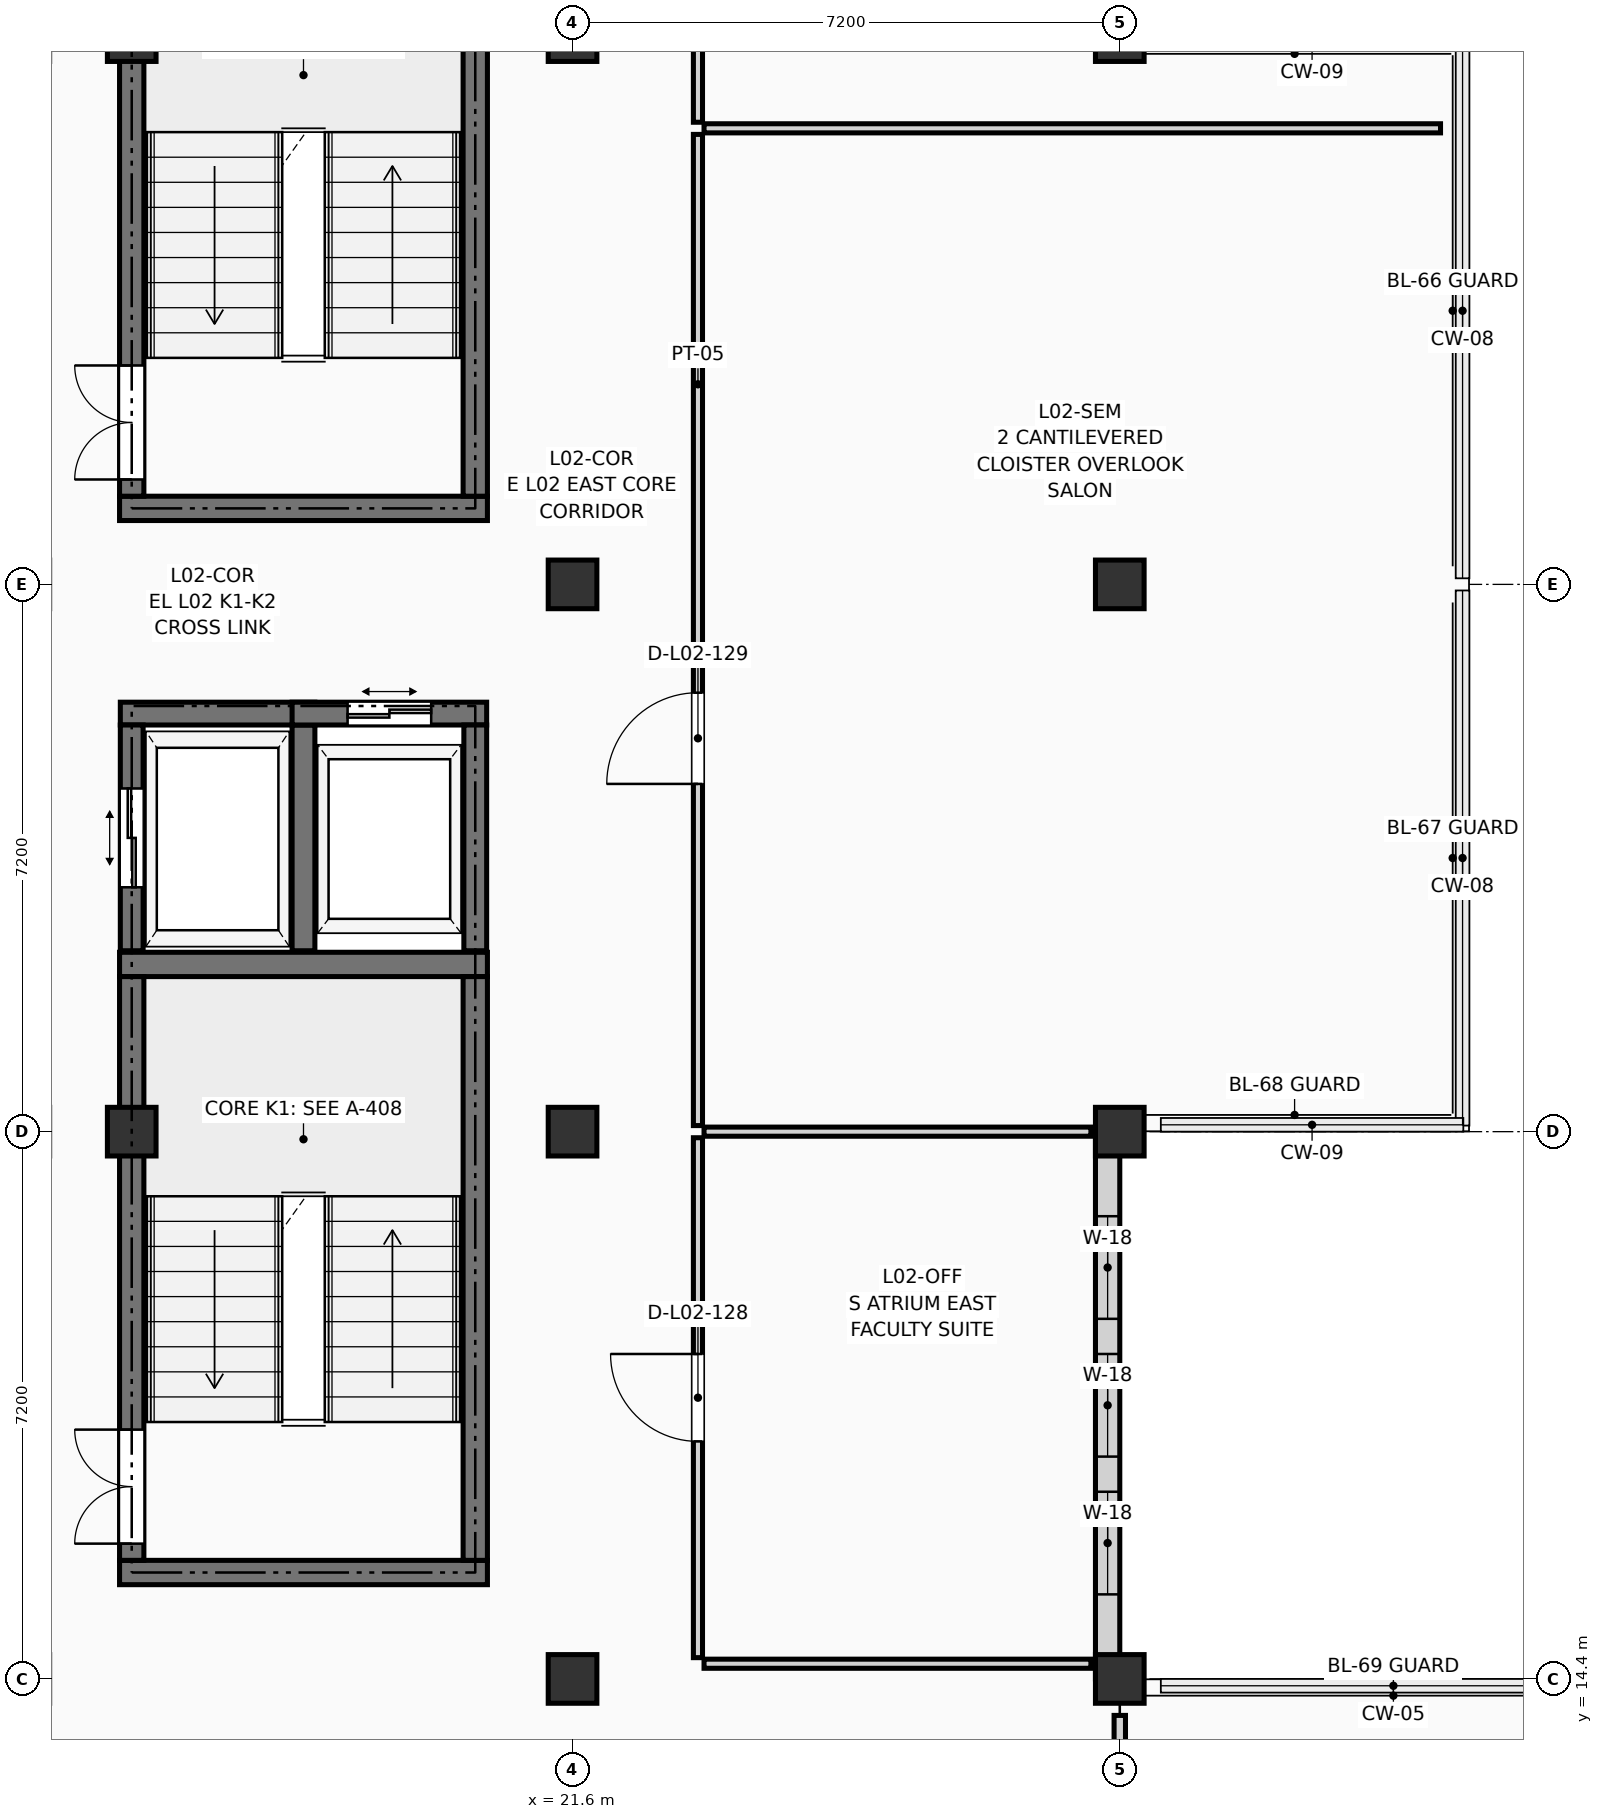
"""IFC4 building model, lengths in metres.
Left out: names, types, materials, properties, quantities, classifications, styles, units other than length and angle.
Written with IfcOpenShell. Run it as: python <this file> out.ifc"""

import sys

from ifc_helpers import new_model, si_unit, direction, frame, frame_2d, origin, origin_2d, place, context, subcontext, project, spatial, rectangle, extrude, element, fill, save


model = new_model("IFC4")
c1 = context("Model", 3, precision=1e-05, world=origin(), true_north=direction((0.0, 1.0)))
c2 = subcontext(c1, "Body", "Model", "MODEL_VIEW")
j1 = project(units=[si_unit("LENGTHUNIT", "METRE"), si_unit("PLANEANGLEUNIT", "RADIAN")], contexts=[c1])
p1 = place(None, origin())
s1 = spatial("IfcSite", under=j1, at=p1, CompositionType="ELEMENT")
p2 = place(p1, origin())
s2 = spatial("IfcBuilding", under=s1, at=p2, CompositionType="ELEMENT")
p3 = place(p2, frame((0.0, 0.0, 8.55)))
s3 = spatial("IfcBuildingStorey", under=s2, at=p3, CompositionType="ELEMENT", Elevation=8.55)
for number, where, z_axis, x_axis in (
    (1, (15.8, 21.6, 0.0), (0.0, 0.0, 1.0), (1.0, 0.0, 0.0)),
    (2, (15.8, 36.0, 0.0), (0.0, 0.0, 1.0), (1.0, 0.0, 0.0)),
    (3, (21.6, 14.4, 0.0), (0.0, 0.0, 1.0), (1.0, 0.0, 0.0)),
    (4, (21.6, 21.6, 0.0), (0.0, 0.0, 1.0), (1.0, 0.0, 0.0)),
    (5, (21.6, 28.8, 0.0), (0.0, 0.0, 1.0), (1.0, 0.0, 0.0)),
    (6, (21.6, 36.0, 0.0), (0.0, 0.0, 1.0), (1.0, 0.0, 0.0)),
    (7, (28.8, 14.4, 0.0), (0.0, 0.0, 1.0), (1.0, 0.0, 0.0)),
    (8, (28.8, 21.6, 0.0), (0.0, 0.0, 1.0), (1.0, 0.0, 0.0)),
    (9, (28.8, 28.8, 0.0), (0.0, 0.0, 1.0), (1.0, 0.0, 0.0)),
    (10, (28.8, 36.0, 0.0), (0.0, 0.0, 1.0), (1.0, 0.0, 0.0)),
):
    element("IfcColumn", number, at=place(p3, frame(where, z_axis=z_axis, x_axis=x_axis)), inside=s3, PredefinedType="COLUMN", context=c2, shape_type="SweptSolid", body=[
        extrude(rectangle(XDim=0.64, YDim=0.64, at=origin_2d()), origin(), (0.0, 0.0, 1.0), 3.6),
    ])
p4 = place(p3, frame((28.64, 14.4, 0.0), z_axis=(0.0, 0.0, 1.0), x_axis=(0.0, 1.0, 0.0)))
e11 = element("IfcWall", 11, at=p4, inside=s3, PredefinedType="SOLIDWALL", context=c2, shape_type="SweptSolid", body=[
    extrude(rectangle(XDim=7.2, YDim=0.32, at=frame_2d((3.6, 0.0))), origin(), (0.0, 0.0, 1.0), 2.84),
])
p5 = place(p4, frame((1.113, 0.0, 0.18)))
e12 = element("IfcOpeningElement", 12, at=p5, cuts=e11, PredefinedType="OPENING", context=c2, shape_type="SweptSolid", body=[
    extrude(rectangle(XDim=1.35, YDim=2.45, at=frame_2d((0.675, 1.225))), frame((0.0, 0.172, 0.0), z_axis=(0.0, -1.0, 0.0), x_axis=(1.0, 0.0, 0.0)), (0.0, 0.0, 1.0), 0.344),
])
p6 = place(p4, frame((2.925, 0.0, 0.18)))
e13 = element("IfcOpeningElement", 13, at=p6, cuts=e11, PredefinedType="OPENING", context=c2, shape_type="SweptSolid", body=[
    extrude(rectangle(XDim=1.35, YDim=2.45, at=frame_2d((0.675, 1.225))), frame((0.0, 0.172, 0.0), z_axis=(0.0, -1.0, 0.0), x_axis=(1.0, 0.0, 0.0)), (0.0, 0.0, 1.0), 0.344),
])
p7 = place(p4, frame((4.738, 0.0, 0.18)))
e14 = element("IfcOpeningElement", 14, at=p7, cuts=e11, PredefinedType="OPENING", context=c2, shape_type="SweptSolid", body=[
    extrude(rectangle(XDim=1.35, YDim=2.45, at=frame_2d((0.675, 1.225))), frame((0.0, 0.172, 0.0), z_axis=(0.0, -1.0, 0.0), x_axis=(1.0, 0.0, 0.0)), (0.0, 0.0, 1.0), 0.344),
])
for number, where, z_axis, x_axis in (
    (15, (15.64, 15.8, 0.0), (0.0, 0.0, 1.0), (1.0, 0.0, 0.0)),
    (16, (15.64, 23.8, 0.0), (0.0, 0.0, 1.0), (1.0, 0.0, 0.0)),
):
    element("IfcWall", number, at=place(p3, frame(where, z_axis=z_axis, x_axis=x_axis)), inside=s3, PredefinedType="SHEAR", context=c2, shape_type="SweptSolid", body=[
        extrude(rectangle(XDim=4.84, YDim=0.32, at=frame_2d((2.42, 0.0))), origin(), (0.0, 0.0, 1.0), 3.39),
    ])
p8 = place(p3, frame((15.8, 15.96, 0.0), z_axis=(0.0, 0.0, 1.0), x_axis=(0.0, 1.0, 0.0)))
e17 = element("IfcWall", 17, at=p8, inside=s3, PredefinedType="SHEAR", context=c2, shape_type="SweptSolid", body=[
    extrude(rectangle(XDim=7.68, YDim=0.32, at=frame_2d((3.84, 0.0))), origin(), (0.0, 0.0, 1.0), 3.39),
])
p9 = place(p8, frame((0.22, 0.0, 0.0)))
e18 = element("IfcOpeningElement", 18, at=p9, cuts=e17, PredefinedType="OPENING", context=c2, shape_type="SweptSolid", body=[
    extrude(rectangle(XDim=1.5, YDim=2.2, at=frame_2d((0.75, 1.1))), frame((0.0, 0.172, 0.0), z_axis=(0.0, -1.0, 0.0), x_axis=(1.0, 0.0, 0.0)), (0.0, 0.0, 1.0), 0.344),
])
p10 = place(p3, frame((20.32, 15.96, 0.0), z_axis=(0.0, 0.0, 1.0), x_axis=(0.0, 1.0, 0.0)))
e19 = element("IfcWall", 19, at=p10, inside=s3, PredefinedType="SHEAR", context=c2, shape_type="SweptSolid", body=[
    extrude(rectangle(XDim=7.68, YDim=0.32, at=frame_2d((3.84, 0.0))), origin(), (0.0, 0.0, 1.0), 3.39),
])
p11 = place(p3, frame((15.64, 29.8, 0.0), z_axis=(0.0, 0.0, 1.0), x_axis=(1.0, 0.0, 0.0)))
e20 = element("IfcWall", 20, at=p11, inside=s3, PredefinedType="SHEAR", context=c2, shape_type="SweptSolid", body=[
    extrude(rectangle(XDim=4.84, YDim=0.32, at=frame_2d((2.42, 0.0))), origin(), (0.0, 0.0, 1.0), 3.39),
])
p12 = place(p3, frame((15.8, 29.96, 0.0), z_axis=(0.0, 0.0, 1.0), x_axis=(0.0, 1.0, 0.0)))
e21 = element("IfcWall", 21, at=p12, inside=s3, PredefinedType="SHEAR", context=c2, shape_type="SweptSolid", body=[
    extrude(rectangle(XDim=7.68, YDim=0.32, at=frame_2d((3.84, 0.0))), origin(), (0.0, 0.0, 1.0), 3.39),
])
p13 = place(p12, frame((0.22, 0.0, 0.0)))
e22 = element("IfcOpeningElement", 22, at=p13, cuts=e21, PredefinedType="OPENING", context=c2, shape_type="SweptSolid", body=[
    extrude(rectangle(XDim=1.5, YDim=2.2, at=frame_2d((0.75, 1.1))), frame((0.0, 0.172, 0.0), z_axis=(0.0, -1.0, 0.0), x_axis=(1.0, 0.0, 0.0)), (0.0, 0.0, 1.0), 0.344),
])
p14 = place(p3, frame((20.32, 29.96, 0.0), z_axis=(0.0, 0.0, 1.0), x_axis=(0.0, 1.0, 0.0)))
e23 = element("IfcWall", 23, at=p14, inside=s3, PredefinedType="SHEAR", context=c2, shape_type="SweptSolid", body=[
    extrude(rectangle(XDim=7.68, YDim=0.32, at=frame_2d((3.84, 0.0))), origin(), (0.0, 0.0, 1.0), 3.39),
])
p15 = place(p3, frame((15.65, 27.1, 0.0), z_axis=(0.0, 0.0, 1.0), x_axis=(1.0, 0.0, 0.0)))
e24 = element("IfcWall", 24, at=p15, inside=s3, PredefinedType="SHEAR", context=c2, shape_type="SweptSolid", body=[
    extrude(rectangle(XDim=2.56, YDim=0.3, at=frame_2d((1.28, 0.0))), origin(), (0.0, 0.0, 1.0), 3.39),
])
p16 = place(p3, frame((15.8, 23.98, 0.0), z_axis=(0.0, 0.0, 1.0), x_axis=(0.0, 1.0, 0.0)))
e25 = element("IfcWall", 25, at=p16, inside=s3, PredefinedType="SHEAR", context=c2, shape_type="SweptSolid", body=[
    extrude(rectangle(XDim=2.97, YDim=0.3, at=frame_2d((1.485, 0.0))), origin(), (0.0, 0.0, 1.0), 3.39),
])
p17 = place(p16, frame((0.835, 0.0, 0.0)))
e26 = element("IfcOpeningElement", 26, at=p17, cuts=e25, PredefinedType="OPENING", context=c2, shape_type="SweptSolid", body=[
    extrude(rectangle(XDim=1.3, YDim=2.25, at=frame_2d((0.65, 1.125))), frame((0.0, 0.162, 0.0), z_axis=(0.0, -1.0, 0.0), x_axis=(1.0, 0.0, 0.0)), (0.0, 0.0, 1.0), 0.324),
])
p18 = place(p3, frame((18.06, 23.98, 0.0), z_axis=(0.0, 0.0, 1.0), x_axis=(0.0, 1.0, 0.0)))
e27 = element("IfcWall", 27, at=p18, inside=s3, PredefinedType="SHEAR", context=c2, shape_type="SweptSolid", body=[
    extrude(rectangle(XDim=2.97, YDim=0.3, at=frame_2d((1.485, 0.0))), origin(), (0.0, 0.0, 1.0), 3.39),
])
p19 = place(p3, frame((17.91, 27.1, 0.0), z_axis=(0.0, 0.0, 1.0), x_axis=(1.0, 0.0, 0.0)))
e28 = element("IfcWall", 28, at=p19, inside=s3, PredefinedType="SHEAR", context=c2, shape_type="SweptSolid", body=[
    extrude(rectangle(XDim=2.56, YDim=0.3, at=frame_2d((1.28, 0.0))), origin(), (0.0, 0.0, 1.0), 3.39),
])
p20 = place(p19, frame((0.73, 0.0, 0.0)))
e29 = element("IfcOpeningElement", 29, at=p20, cuts=e28, PredefinedType="OPENING", context=c2, shape_type="SweptSolid", body=[
    extrude(rectangle(XDim=1.1, YDim=2.2, at=frame_2d((0.55, 1.1))), frame((0.0, 0.162, 0.0), z_axis=(0.0, -1.0, 0.0), x_axis=(1.0, 0.0, 0.0)), (0.0, 0.0, 1.0), 0.324),
])
p21 = place(p3, frame((20.32, 23.98, 0.0), z_axis=(0.0, 0.0, 1.0), x_axis=(0.0, 1.0, 0.0)))
e30 = element("IfcWall", 30, at=p21, inside=s3, PredefinedType="SHEAR", context=c2, shape_type="SweptSolid", body=[
    extrude(rectangle(XDim=2.97, YDim=0.3, at=frame_2d((1.485, 0.0))), origin(), (0.0, 0.0, 1.0), 3.39),
])
p22 = place(p3, frame((28.8, 9.68, 0.0), z_axis=(0.0, 0.0, 1.0), x_axis=(0.0, 1.0, 0.0)))
e31 = element("IfcWall", 31, at=p22, inside=s3, PredefinedType="PARTITIONING", context=c2, shape_type="SweptSolid", body=[
    extrude(rectangle(XDim=4.24, YDim=0.15, at=frame_2d((2.12, 0.0))), origin(), (0.0, 0.0, 1.0), 2.655),
])
p23 = place(p3, frame((23.25, 14.68, 0.0), z_axis=(0.0, 0.0, 1.0), x_axis=(0.0, 1.0, 0.0)))
e32 = element("IfcWall", 32, at=p23, inside=s3, PredefinedType="PARTITIONING", context=c2, shape_type="SweptSolid", body=[
    extrude(rectangle(XDim=6.84, YDim=0.12, at=frame_2d((3.42, 0.0))), origin(), (0.0, 0.0, 1.0), 3.375),
])
p24 = place(p23, frame((2.845, 0.0, 0.0)))
e33 = element("IfcOpeningElement", 33, at=p24, cuts=e32, PredefinedType="OPENING", context=c2, shape_type="SweptSolid", body=[
    extrude(rectangle(XDim=1.15, YDim=2.18, at=frame_2d((0.575, 1.09))), frame((0.0, 0.072, 0.0), z_axis=(0.0, -1.0, 0.0), x_axis=(1.0, 0.0, 0.0)), (0.0, 0.0, 1.0), 0.144),
])
p25 = place(p3, frame((23.33, 14.6, 0.0), z_axis=(0.0, 0.0, 1.0), x_axis=(1.0, 0.0, 0.0)))
e34 = element("IfcWall", 34, at=p25, inside=s3, PredefinedType="PARTITIONING", context=c2, shape_type="SweptSolid", body=[
    extrude(rectangle(XDim=5.09, YDim=0.12, at=frame_2d((2.545, 0.0))), origin(), (0.0, 0.0, 1.0), 2.595),
])
p26 = place(p3, frame((23.33, 21.6, 0.0), z_axis=(0.0, 0.0, 1.0), x_axis=(1.0, 0.0, 0.0)))
e35 = element("IfcWall", 35, at=p26, inside=s3, PredefinedType="PARTITIONING", context=c2, shape_type="SweptSolid", body=[
    extrude(rectangle(XDim=5.09, YDim=0.12, at=frame_2d((2.545, 0.0))), origin(), (0.0, 0.0, 1.0), 2.691),
])
p27 = place(p3, frame((23.25, 21.68, 0.0), z_axis=(0.0, 0.0, 1.0), x_axis=(0.0, 1.0, 0.0)))
e36 = element("IfcWall", 36, at=p27, inside=s3, PredefinedType="PARTITIONING", context=c2, shape_type="SweptSolid", body=[
    extrude(rectangle(XDim=13.04, YDim=0.12, at=frame_2d((6.52, 0.0))), origin(), (0.0, 0.0, 1.0), 3.375),
])
p28 = place(p27, frame((4.495, 0.0, 0.0)))
e37 = element("IfcOpeningElement", 37, at=p28, cuts=e36, PredefinedType="OPENING", context=c2, shape_type="SweptSolid", body=[
    extrude(rectangle(XDim=1.2, YDim=2.15, at=frame_2d((0.6, 1.075))), frame((0.0, 0.072, 0.0), z_axis=(0.0, -1.0, 0.0), x_axis=(1.0, 0.0, 0.0)), (0.0, 0.0, 1.0), 0.144),
])
p29 = place(p3, frame((23.33, 34.8, 0.0), z_axis=(0.0, 0.0, 1.0), x_axis=(1.0, 0.0, 0.0)))
e38 = element("IfcWall", 38, at=p29, inside=s3, PredefinedType="PARTITIONING", context=c2, shape_type="SweptSolid", body=[
    extrude(rectangle(XDim=9.69, YDim=0.12, at=frame_2d((4.845, 0.0))), origin(), (0.0, 0.0, 1.0), 3.375),
])
p30 = place(p3, frame((23.25, 34.88, 0.0), z_axis=(0.0, 0.0, 1.0), x_axis=(0.0, 1.0, 0.0)))
e39 = element("IfcWall", 39, at=p30, inside=s3, PredefinedType="PARTITIONING", context=c2, shape_type="SweptSolid", body=[
    extrude(rectangle(XDim=8.44, YDim=0.12, at=frame_2d((4.22, 0.0))), origin(), (0.0, 0.0, 1.0), 3.375),
])
p31 = place(p5, origin())
e40 = element("IfcWindow", 40, at=p31, inside=s3, PartitioningType="SINGLE_PANEL", PredefinedType="WINDOW", context=c2, shape_type="SweptSolid", body=[
    extrude(rectangle(XDim=1.35, YDim=2.45, at=frame_2d((0.675, 1.225))), frame((0.0, 0.03, 0.0), z_axis=(0.0, -1.0, 0.0), x_axis=(1.0, 0.0, 0.0)), (0.0, 0.0, 1.0), 0.06),
])
fill(e12, e40)
p32 = place(p6, origin())
e41 = element("IfcWindow", 41, at=p32, inside=s3, PartitioningType="SINGLE_PANEL", PredefinedType="WINDOW", context=c2, shape_type="SweptSolid", body=[
    extrude(rectangle(XDim=1.35, YDim=2.45, at=frame_2d((0.675, 1.225))), frame((0.0, 0.03, 0.0), z_axis=(0.0, -1.0, 0.0), x_axis=(1.0, 0.0, 0.0)), (0.0, 0.0, 1.0), 0.06),
])
fill(e13, e41)
p33 = place(p7, origin())
e42 = element("IfcWindow", 42, at=p33, inside=s3, PartitioningType="SINGLE_PANEL", PredefinedType="WINDOW", context=c2, shape_type="SweptSolid", body=[
    extrude(rectangle(XDim=1.35, YDim=2.45, at=frame_2d((0.675, 1.225))), frame((0.0, 0.03, 0.0), z_axis=(0.0, -1.0, 0.0), x_axis=(1.0, 0.0, 0.0)), (0.0, 0.0, 1.0), 0.06),
])
fill(e14, e42)
p34 = place(p9, origin())
e43 = element("IfcDoor", 43, at=p34, inside=s3, OperationType="DOUBLE_DOOR_SINGLE_SWING", PredefinedType="DOOR", context=c2, shape_type="SweptSolid", body=[
    extrude(rectangle(XDim=1.5, YDim=2.2, at=frame_2d((0.75, 1.1))), frame((0.0, 0.025, 0.0), z_axis=(0.0, -1.0, 0.0), x_axis=(1.0, 0.0, 0.0)), (0.0, 0.0, 1.0), 0.05),
])
fill(e18, e43)
p35 = place(p13, origin())
e44 = element("IfcDoor", 44, at=p35, inside=s3, OperationType="DOUBLE_DOOR_SINGLE_SWING", PredefinedType="DOOR", context=c2, shape_type="SweptSolid", body=[
    extrude(rectangle(XDim=1.5, YDim=2.2, at=frame_2d((0.75, 1.1))), frame((0.0, 0.025, 0.0), z_axis=(0.0, -1.0, 0.0), x_axis=(1.0, 0.0, 0.0)), (0.0, 0.0, 1.0), 0.05),
])
fill(e22, e44)
p36 = place(p17, origin())
e45 = element("IfcDoor", 45, at=p36, inside=s3, OperationType="DOUBLE_DOOR_SLIDING", PredefinedType="DOOR", context=c2, shape_type="SweptSolid", body=[
    extrude(rectangle(XDim=1.3, YDim=2.25, at=frame_2d((0.65, 1.125))), frame((0.0, 0.025, 0.0), z_axis=(0.0, -1.0, 0.0), x_axis=(1.0, 0.0, 0.0)), (0.0, 0.0, 1.0), 0.05),
])
fill(e26, e45)
p37 = place(p20, origin())
e46 = element("IfcDoor", 46, at=p37, inside=s3, OperationType="DOUBLE_DOOR_SLIDING", PredefinedType="DOOR", context=c2, shape_type="SweptSolid", body=[
    extrude(rectangle(XDim=1.1, YDim=2.2, at=frame_2d((0.55, 1.1))), frame((0.0, 0.025, 0.0), z_axis=(0.0, -1.0, 0.0), x_axis=(1.0, 0.0, 0.0)), (0.0, 0.0, 1.0), 0.05),
])
fill(e29, e46)
p38 = place(p24, origin())
e47 = element("IfcDoor", 47, at=p38, inside=s3, OperationType="SINGLE_SWING_RIGHT", PredefinedType="DOOR", context=c2, shape_type="SweptSolid", body=[
    extrude(rectangle(XDim=1.15, YDim=2.18, at=frame_2d((0.575, 1.09))), frame((0.0, 0.025, 0.0), z_axis=(0.0, -1.0, 0.0), x_axis=(1.0, 0.0, 0.0)), (0.0, 0.0, 1.0), 0.05),
])
fill(e33, e47)
p39 = place(p28, origin())
e48 = element("IfcDoor", 48, at=p39, inside=s3, OperationType="SINGLE_SWING_LEFT", PredefinedType="DOOR", context=c2, shape_type="SweptSolid", body=[
    extrude(rectangle(XDim=1.2, YDim=2.15, at=frame_2d((0.6, 1.075))), frame((0.0, 0.025, 0.0), z_axis=(0.0, -1.0, 0.0), x_axis=(1.0, 0.0, 0.0)), (0.0, 0.0, 1.0), 0.05),
])
fill(e37, e48)
save(model, sys.argv[1])
